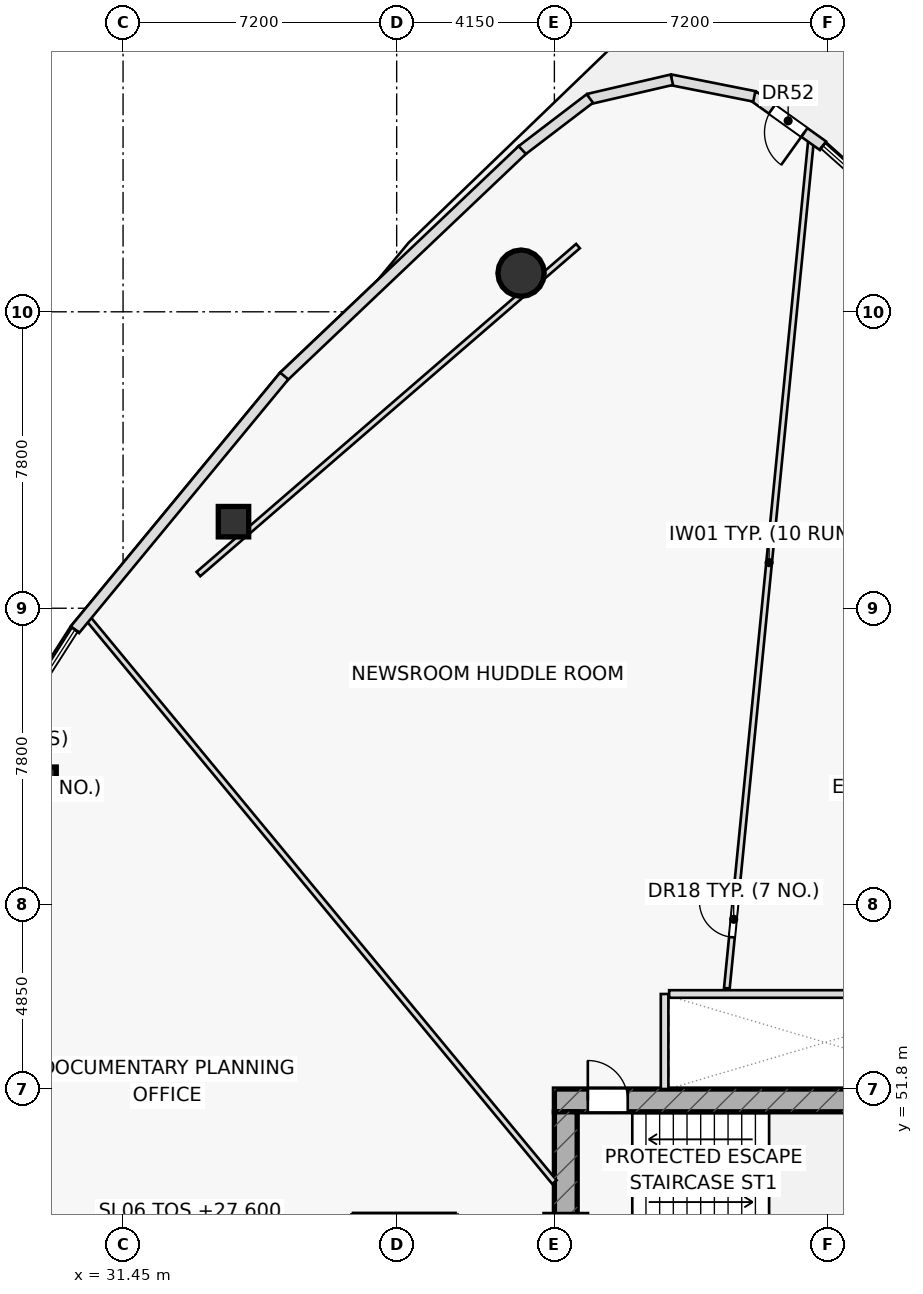
"""IFC4 building model, lengths in metres.
Left out: names, types, materials, properties, quantities, classifications, styles, units other than length and angle.
Written with IfcOpenShell. Run it as: python <this file> out.ifc"""

import sys

from ifc_helpers import new_model, si_unit, direction, frame, frame_2d, origin, origin_2d, place, context, subcontext, project, spatial, rectangle, hollow_rectangle, hollow_circle, extrude, element, fill, save


model = new_model("IFC4")
c1 = context("Model", 3, precision=1e-05, world=origin(), true_north=direction((0.0, 1.0)))
c2 = subcontext(c1, "Body", "Model", "MODEL_VIEW")
j1 = project(units=[si_unit("LENGTHUNIT", "METRE"), si_unit("PLANEANGLEUNIT", "RADIAN")], contexts=[c1])
p1 = place(None, origin())
s1 = spatial("IfcSite", under=j1, at=p1, CompositionType="ELEMENT")
p2 = place(p1, origin())
s2 = spatial("IfcBuilding", under=s1, at=p2, CompositionType="ELEMENT")
p3 = place(p2, frame((0.0, 0.0, 27.6)))
s3 = spatial("IfcBuildingStorey", under=s2, at=p3, CompositionType="ELEMENT", Elevation=27.6)
p4 = place(p3, frame((42.8, 51.5, 0.0), z_axis=(0.0, 0.0, 1.0), x_axis=(1.0, 0.0, 0.0)))
e1 = element("IfcWall", 1, at=p4, inside=s3, PredefinedType="SHEAR", context=c2, shape_type="SweptSolid", body=[
    extrude(rectangle(XDim=14.4, YDim=0.6, at=frame_2d((7.2, 0.0))), origin(), (0.0, 0.0, 1.0), 3.6),
])
p5 = place(p4, frame((0.88, 0.0, 0.0)))
e2 = element("IfcOpeningElement", 2, at=p5, cuts=e1, PredefinedType="OPENING", context=c2, shape_type="SweptSolid", body=[
    extrude(rectangle(XDim=1.05, YDim=2.2, at=frame_2d((0.525, 1.1))), frame((0.0, 0.31, 0.0), z_axis=(0.0, -1.0, 0.0), x_axis=(1.0, 0.0, 0.0)), (0.0, 0.0, 1.0), 0.62),
])
p6 = place(p3, frame((43.1, 38.8, 0.0), z_axis=(0.0, 0.0, 1.0), x_axis=(0.0, 1.0, 0.0)))
e3 = element("IfcWall", 3, at=p6, inside=s3, PredefinedType="SHEAR", context=c2, shape_type="SweptSolid", body=[
    extrude(rectangle(XDim=12.4, YDim=0.6, at=frame_2d((6.2, 0.0))), origin(), (0.0, 0.0, 1.0), 3.6),
])
p7 = place(p3, frame((41.923, 73.266, 0.0), z_axis=(0.0, 0.0, 1.0), x_axis=(1.0, 0.0, 0.0)))
e4 = element("IfcColumn", 4, at=p7, inside=s3, PredefinedType="COLUMN", context=c2, shape_type="SweptSolid", body=[
    extrude(hollow_circle(Radius=0.61, WallThickness=0.05, at=origin_2d()), origin(), (0.0, 0.0, 1.0), 3.6),
])
for number, where, z_axis, x_axis in (
    (5, (34.356, 66.728, 0.0), (0.0, 0.0, 1.0), (1.0, 0.0, 0.0)),
    (6, (29.292, 59.872, 0.0), (0.0, 0.0, 1.0), (1.0, 0.0, 0.0)),
):
    element("IfcColumn", number, at=place(p3, frame(where, z_axis=z_axis, x_axis=x_axis)), inside=s3, PredefinedType="COLUMN", context=c2, shape_type="SweptSolid", body=[
        extrude(hollow_rectangle(XDim=0.8, YDim=0.8, WallThickness=0.045, at=origin_2d()), origin(), (0.0, 0.0, 1.0), 3.6),
    ])
p8 = place(p3, frame((45.7, 51.8, 0.0), z_axis=(0.0, 0.0, 1.0), x_axis=(0.0, 1.0, 0.0)))
e7 = element("IfcWall", 7, at=p8, inside=s3, PredefinedType="PARTITIONING", context=c2, shape_type="SweptSolid", body=[
    extrude(rectangle(XDim=2.5, YDim=0.2, at=frame_2d((1.25, 0.0))), origin(), (0.0, 0.0, 1.0), 3.6),
])
p9 = place(p3, frame((43.421, 73.979, 0.0), z_axis=(0.0, 0.0, 1.0), x_axis=(-0.756659135409, -0.653809569218, 0.0)))
e8 = element("IfcWall", 8, at=p9, inside=s3, PredefinedType="PARTITIONING", context=c2, shape_type="SweptSolid", body=[
    extrude(rectangle(XDim=13.2, YDim=0.15, at=frame_2d((6.6, 0.0))), origin(), (0.0, 0.0, 1.0), 2.925),
])
p10 = place(p3, frame((47.338, 54.45, 0.0), z_axis=(0.0, 0.0, 1.0), x_axis=(0.098805694286, 0.995106745418, 0.0)))
e9 = element("IfcWall", 9, at=p10, inside=s3, PredefinedType="PARTITIONING", context=c2, shape_type="SweptSolid", body=[
    extrude(rectangle(XDim=22.51, YDim=0.15, at=frame_2d((11.255, 0.0))), origin(), (0.0, 0.0, 1.0), 2.975),
])
p11 = place(p10, frame((1.35, 0.0, 0.0)))
e10 = element("IfcOpeningElement", 10, at=p11, cuts=e9, PredefinedType="OPENING", context=c2, shape_type="SweptSolid", body=[
    extrude(rectangle(XDim=0.95, YDim=2.05, at=frame_2d((0.475, 1.025))), frame((0.0, 0.085, 0.0), z_axis=(0.0, -1.0, 0.0), x_axis=(1.0, 0.0, 0.0)), (0.0, 0.0, 1.0), 0.17),
])
p12 = place(p3, frame((42.8, 49.351, 0.0), z_axis=(0.0, 0.0, 1.0), x_axis=(-0.637468497452, 0.770476420637, 0.0)))
e11 = element("IfcWall", 11, at=p12, inside=s3, PredefinedType="PARTITIONING", context=c2, shape_type="SweptSolid", body=[
    extrude(rectangle(XDim=19.339, YDim=0.15, at=frame_2d((9.669, 0.0))), origin(), (0.0, 0.0, 1.0), 2.925),
])
p13 = place(p3, frame((37.5, 48.45, 0.0), z_axis=(0.0, 0.0, 1.0), x_axis=(1.0, 0.0, 0.0)))
e12 = element("IfcWall", 12, at=p13, inside=s3, PredefinedType="PARTITIONING", context=c2, shape_type="SweptSolid", body=[
    extrude(rectangle(XDim=2.7, YDim=0.18, at=frame_2d((1.35, 0.0))), origin(), (0.0, 0.0, 1.0), 3.6),
])
p14 = place(p3, frame((49.868, 76.619, 0.0), z_axis=(0.0, 0.0, 1.0), x_axis=(-0.81360174319, 0.581422568772, 0.0)))
e13 = element("IfcWall", 13, at=p14, inside=s3, PredefinedType="STANDARD", context=c2, shape_type="SweptSolid", body=[
    extrude(rectangle(XDim=2.254, YDim=0.28, at=frame_2d((1.127, 0.0))), origin(), (0.0, 0.0, 1.0), 3.6),
])
p15 = place(p14, frame((0.602, 0.0, 0.0)))
e14 = element("IfcOpeningElement", 14, at=p15, cuts=e13, PredefinedType="OPENING", context=c2, shape_type="SweptSolid", body=[
    extrude(rectangle(XDim=1.05, YDim=2.2, at=frame_2d((0.525, 1.1))), frame((0.0, 0.15, 0.0), z_axis=(0.0, -1.0, 0.0), x_axis=(1.0, 0.0, 0.0)), (0.0, 0.0, 1.0), 0.3),
])
p16 = place(p3, frame((48.061, 77.918, 0.0), z_axis=(0.0, 0.0, 1.0), x_axis=(-0.980768623239, 0.195174044558, 0.0)))
e15 = element("IfcWall", 15, at=p16, inside=s3, PredefinedType="STANDARD", context=c2, shape_type="SweptSolid", body=[
    extrude(rectangle(XDim=2.243, YDim=0.28, at=frame_2d((1.122, 0.0))), origin(), (0.0, 0.0, 1.0), 3.6),
])
p17 = place(p3, frame((45.891, 78.356, 0.0), z_axis=(0.0, 0.0, 1.0), x_axis=(-0.974155828052, -0.225877007845, 0.0)))
e16 = element("IfcWall", 16, at=p17, inside=s3, PredefinedType="STANDARD", context=c2, shape_type="SweptSolid", body=[
    extrude(rectangle(XDim=2.243, YDim=0.28, at=frame_2d((1.121, 0.0))), origin(), (0.0, 0.0, 1.0), 3.6),
])
p18 = place(p3, frame((43.732, 77.862, 0.0), z_axis=(0.0, 0.0, 1.0), x_axis=(-0.794993643274, -0.606617760335, 0.0)))
e17 = element("IfcWall", 17, at=p18, inside=s3, PredefinedType="STANDARD", context=c2, shape_type="SweptSolid", body=[
    extrude(rectangle(XDim=2.265, YDim=0.28, at=frame_2d((1.133, 0.0))), origin(), (0.0, 0.0, 1.0), 3.6),
])
p19 = place(p3, frame((41.954, 76.507, 0.0), z_axis=(0.0, 0.0, 1.0), x_axis=(-0.725085945705, -0.68865838508, 0.0)))
e18 = element("IfcWall", 18, at=p19, inside=s3, PredefinedType="STANDARD", context=c2, shape_type="SweptSolid", body=[
    extrude(rectangle(XDim=8.666, YDim=0.28, at=frame_2d((4.333, 0.0))), origin(), (0.0, 0.0, 1.0), 3.6),
])
p20 = place(p3, frame((35.691, 70.561, 0.0), z_axis=(0.0, 0.0, 1.0), x_axis=(-0.636414008512, -0.771347658173, 0.0)))
e19 = element("IfcWall", 19, at=p20, inside=s3, PredefinedType="STANDARD", context=c2, shape_type="SweptSolid", body=[
    extrude(rectangle(XDim=8.654, YDim=0.28, at=frame_2d((4.327, 0.0))), origin(), (0.0, 0.0, 1.0), 3.6),
])
p21 = place(p3, frame((45.82, 54.3, 0.0), z_axis=(0.0, 0.0, 1.0), x_axis=(1.0, 0.0, 0.0)))
e20 = element("IfcWall", 20, at=p21, inside=s3, PredefinedType="PARTITIONING", context=c2, shape_type="SweptSolid", body=[
    extrude(rectangle(XDim=8.31, YDim=0.2, at=frame_2d((4.155, 0.0))), origin(), (0.0, 0.0, 1.0), 3.6),
])
p22 = place(p5, origin())
e21 = element("IfcDoor", 21, at=p22, inside=s3, OperationType="SINGLE_SWING_LEFT", PredefinedType="DOOR", context=c2, shape_type="SweptSolid", body=[
    extrude(rectangle(XDim=1.05, YDim=2.2, at=frame_2d((0.525, 1.1))), frame((0.0, 0.025, 0.0), z_axis=(0.0, -1.0, 0.0), x_axis=(1.0, 0.0, 0.0)), (0.0, 0.0, 1.0), 0.05),
])
fill(e2, e21)
p23 = place(p11, origin())
e22 = element("IfcDoor", 22, at=p23, inside=s3, OperationType="SINGLE_SWING_RIGHT", PredefinedType="DOOR", context=c2, shape_type="SweptSolid", body=[
    extrude(rectangle(XDim=0.95, YDim=2.05, at=frame_2d((0.475, 1.025))), frame((0.0, 0.025, 0.0), z_axis=(0.0, -1.0, 0.0), x_axis=(1.0, 0.0, 0.0)), (0.0, 0.0, 1.0), 0.05),
])
fill(e10, e22)
p24 = place(p15, origin())
e23 = element("IfcDoor", 23, at=p24, inside=s3, OperationType="SINGLE_SWING_LEFT", PredefinedType="DOOR", context=c2, shape_type="SweptSolid", body=[
    extrude(rectangle(XDim=1.05, YDim=2.2, at=frame_2d((0.525, 1.1))), frame((0.0, 0.025, 0.0), z_axis=(0.0, -1.0, 0.0), x_axis=(1.0, 0.0, 0.0)), (0.0, 0.0, 1.0), 0.05),
])
fill(e14, e23)
save(model, sys.argv[1])
